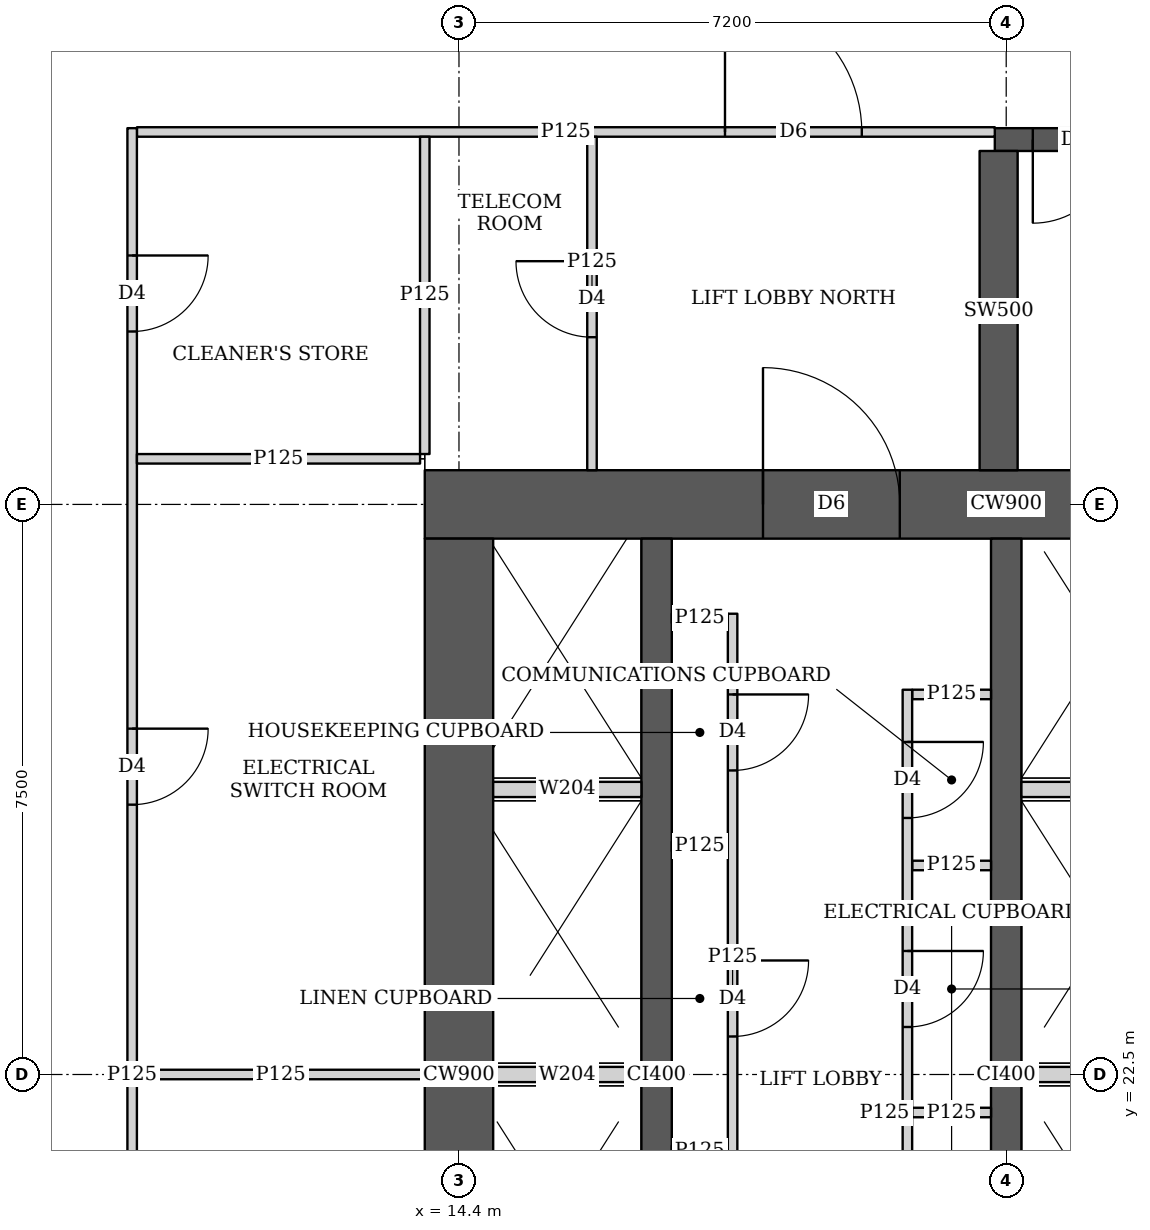
"""IFC4 building model, lengths in metres.
Left out: names, types, materials, properties, quantities, classifications, styles, units other than length and angle.
Written with IfcOpenShell. Run it as: python <this file> out.ifc"""

import sys

from ifc_helpers import new_model, si_unit, direction, frame, frame_2d, origin, place, context, subcontext, project, spatial, rectangle, extrude, element, fill, save


model = new_model("IFC4")
c1 = context("Model", 3, precision=1e-05, world=origin(), true_north=direction((0.0, 1.0)))
c2 = subcontext(c1, "Body", "Model", "MODEL_VIEW")
j1 = project(units=[si_unit("LENGTHUNIT", "METRE"), si_unit("PLANEANGLEUNIT", "RADIAN")], contexts=[c1])
p1 = place(None, origin())
s1 = spatial("IfcSite", under=j1, at=p1, CompositionType="ELEMENT")
p2 = place(p1, origin())
s2 = spatial("IfcBuilding", under=s1, at=p2, CompositionType="ELEMENT")
p3 = place(p2, frame((0.0, 0.0, 14.6)))
s3 = spatial("IfcBuildingStorey", under=s2, at=p3, CompositionType="ELEMENT", Elevation=14.6)
p4 = place(p3, frame((13.95, 30.0, 0.0), z_axis=(0.0, 0.0, 1.0), x_axis=(1.0, 0.0, 0.0)))
e1 = element("IfcWall", 1, at=p4, inside=s3, PredefinedType="SHEAR", context=c2, shape_type="SweptSolid", body=[
    extrude(rectangle(XDim=15.3, YDim=0.9, at=frame_2d((7.65, 0.0))), origin(), (0.0, 0.0, 1.0), 5.4),
])
p5 = place(p4, frame((4.45, 0.0, 0.0)))
e2 = element("IfcOpeningElement", 2, at=p5, cuts=e1, PredefinedType="OPENING", context=c2, shape_type="SweptSolid", body=[
    extrude(rectangle(XDim=1.8, YDim=2.1, at=frame_2d((0.9, 1.05))), frame((0.0, 0.46, 0.0), z_axis=(0.0, -1.0, 0.0), x_axis=(1.0, 0.0, 0.0)), (0.0, 0.0, 1.0), 0.92),
])
p6 = place(p4, frame((10.7, 0.0, 0.0)))
e3 = element("IfcOpeningElement", 3, at=p6, cuts=e1, PredefinedType="OPENING", context=c2, shape_type="SweptSolid", body=[
    extrude(rectangle(XDim=1.1, YDim=2.1, at=frame_2d((0.55, 1.05))), frame((0.0, 0.46, 0.0), z_axis=(0.0, -1.0, 0.0), x_axis=(1.0, 0.0, 0.0)), (0.0, 0.0, 1.0), 0.92),
])
p7 = place(p3, frame((14.4, 15.45, 0.0), z_axis=(0.0, 0.0, 1.0), x_axis=(0.0, 1.0, 0.0)))
e4 = element("IfcWall", 4, at=p7, inside=s3, PredefinedType="SHEAR", context=c2, shape_type="SweptSolid", body=[
    extrude(rectangle(XDim=14.1, YDim=0.9, at=frame_2d((7.05, 0.0))), origin(), (0.0, 0.0, 1.0), 5.4),
])
for number, where, z_axis, x_axis in (
    (5, (17.0, 15.45, 0.0), (0.0, 0.0, 1.0), (0.0, 1.0, 0.0)),
    (6, (21.6, 15.45, 0.0), (0.0, 0.0, 1.0), (0.0, 1.0, 0.0)),
):
    element("IfcWall", number, at=place(p3, frame(where, z_axis=z_axis, x_axis=x_axis)), inside=s3, PredefinedType="SHEAR", context=c2, shape_type="SweptSolid", body=[
        extrude(rectangle(XDim=14.1, YDim=0.4, at=frame_2d((7.05, 0.0))), origin(), (0.0, 0.0, 1.0), 5.4),
    ])
p8 = place(p3, frame((21.45, 34.8, 0.0), z_axis=(0.0, 0.0, 1.0), x_axis=(1.0, 0.0, 0.0)))
e7 = element("IfcWall", 7, at=p8, inside=s3, PredefinedType="SHEAR", context=c2, shape_type="SweptSolid", body=[
    extrude(rectangle(XDim=7.5, YDim=0.3, at=frame_2d((3.75, 0.0))), origin(), (0.0, 0.0, 1.0), 5.4),
])
p9 = place(p8, frame((0.5, 0.0, 0.0)))
e8 = element("IfcOpeningElement", 8, at=p9, cuts=e7, PredefinedType="OPENING", context=c2, shape_type="SweptSolid", body=[
    extrude(rectangle(XDim=1.1, YDim=2.1, at=frame_2d((0.55, 1.05))), frame((0.0, 0.16, 0.0), z_axis=(0.0, -1.0, 0.0), x_axis=(1.0, 0.0, 0.0)), (0.0, 0.0, 1.0), 0.32),
])
p10 = place(p3, frame((21.5, 30.45, 0.0), z_axis=(0.0, 0.0, 1.0), x_axis=(0.0, 1.0, 0.0)))
e9 = element("IfcWall", 9, at=p10, inside=s3, PredefinedType="SHEAR", context=c2, shape_type="SweptSolid", body=[
    extrude(rectangle(XDim=4.2, YDim=0.5, at=frame_2d((2.1, 0.0))), origin(), (0.0, 0.0, 1.0), 5.4),
])
p11 = place(p3, frame((10.1, 10.05, 0.0), z_axis=(0.0, 0.0, 1.0), x_axis=(0.0, 1.0, 0.0)))
e10 = element("IfcWall", 10, at=p11, inside=s3, PredefinedType="PARTITIONING", context=c2, shape_type="SweptSolid", body=[
    extrude(rectangle(XDim=24.9, YDim=0.125, at=frame_2d((12.45, 0.0))), origin(), (0.0, 0.0, 1.0), 3.5),
])
p12 = place(p11, frame((1.675, 0.0, 0.0)))
e11 = element("IfcOpeningElement", 11, at=p12, cuts=e10, PredefinedType="OPENING", context=c2, shape_type="SweptSolid", body=[
    extrude(rectangle(XDim=1.0, YDim=2.1, at=frame_2d((0.5, 1.05))), frame((0.0, 0.073, 0.0), z_axis=(0.0, -1.0, 0.0), x_axis=(1.0, 0.0, 0.0)), (0.0, 0.0, 1.0), 0.145),
])
p13 = place(p11, frame((7.9, 0.0, 0.0)))
e12 = element("IfcOpeningElement", 12, at=p13, cuts=e10, PredefinedType="OPENING", context=c2, shape_type="SweptSolid", body=[
    extrude(rectangle(XDim=1.0, YDim=2.1, at=frame_2d((0.5, 1.05))), frame((0.0, 0.073, 0.0), z_axis=(0.0, -1.0, 0.0), x_axis=(1.0, 0.0, 0.0)), (0.0, 0.0, 1.0), 0.145),
])
p14 = place(p11, frame((16.0, 0.0, 0.0)))
e13 = element("IfcOpeningElement", 13, at=p14, cuts=e10, PredefinedType="OPENING", context=c2, shape_type="SweptSolid", body=[
    extrude(rectangle(XDim=1.0, YDim=2.1, at=frame_2d((0.5, 1.05))), frame((0.0, 0.073, 0.0), z_axis=(0.0, -1.0, 0.0), x_axis=(1.0, 0.0, 0.0)), (0.0, 0.0, 1.0), 0.145),
])
p15 = place(p11, frame((22.225, 0.0, 0.0)))
e14 = element("IfcOpeningElement", 14, at=p15, cuts=e10, PredefinedType="OPENING", context=c2, shape_type="SweptSolid", body=[
    extrude(rectangle(XDim=1.0, YDim=2.1, at=frame_2d((0.5, 1.05))), frame((0.0, 0.073, 0.0), z_axis=(0.0, -1.0, 0.0), x_axis=(1.0, 0.0, 0.0)), (0.0, 0.0, 1.0), 0.145),
])
p16 = place(p3, frame((10.163, 22.5, 0.0), z_axis=(0.0, 0.0, 1.0), x_axis=(1.0, 0.0, 0.0)))
e15 = element("IfcWall", 15, at=p16, inside=s3, PredefinedType="PARTITIONING", context=c2, shape_type="SweptSolid", body=[
    extrude(rectangle(XDim=3.787, YDim=0.125, at=frame_2d((1.894, 0.0))), origin(), (0.0, 0.0, 1.0), 3.5),
])
p17 = place(p3, frame((10.163, 30.6, 0.0), z_axis=(0.0, 0.0, 1.0), x_axis=(1.0, 0.0, 0.0)))
e16 = element("IfcWall", 16, at=p17, inside=s3, PredefinedType="PARTITIONING", context=c2, shape_type="SweptSolid", body=[
    extrude(rectangle(XDim=3.725, YDim=0.125, at=frame_2d((1.862, 0.0))), origin(), (0.0, 0.0, 1.0), 3.5),
])
p18 = place(p3, frame((13.95, 30.663, 0.0), z_axis=(0.0, 0.0, 1.0), x_axis=(0.0, 1.0, 0.0)))
e17 = element("IfcWall", 17, at=p18, inside=s3, PredefinedType="PARTITIONING", context=c2, shape_type="SweptSolid", body=[
    extrude(rectangle(XDim=4.174, YDim=0.125, at=frame_2d((2.087, 0.0))), origin(), (0.0, 0.0, 1.0), 3.5),
])
p19 = place(p3, frame((10.163, 34.9, 0.0), z_axis=(0.0, 0.0, 1.0), x_axis=(1.0, 0.0, 0.0)))
e18 = element("IfcWall", 18, at=p19, inside=s3, PredefinedType="PARTITIONING", context=c2, shape_type="SweptSolid", body=[
    extrude(rectangle(XDim=11.287, YDim=0.125, at=frame_2d((5.644, 0.0))), origin(), (0.0, 0.0, 1.0), 3.1),
])
p20 = place(p19, frame((7.737, 0.0, 0.0)))
e19 = element("IfcOpeningElement", 19, at=p20, cuts=e18, PredefinedType="OPENING", context=c2, shape_type="SweptSolid", body=[
    extrude(rectangle(XDim=1.8, YDim=2.1, at=frame_2d((0.9, 1.05))), frame((0.0, 0.073, 0.0), z_axis=(0.0, -1.0, 0.0), x_axis=(1.0, 0.0, 0.0)), (0.0, 0.0, 1.0), 0.145),
])
p21 = place(p3, frame((16.15, 30.45, 0.0), z_axis=(0.0, 0.0, 1.0), x_axis=(0.0, 1.0, 0.0)))
e20 = element("IfcWall", 20, at=p21, inside=s3, PredefinedType="PARTITIONING", context=c2, shape_type="SweptSolid", body=[
    extrude(rectangle(XDim=4.387, YDim=0.125, at=frame_2d((2.193, 0.0))), origin(), (0.0, 0.0, 1.0), 5.1),
])
p22 = place(p21, frame((1.75, 0.0, 0.0)))
e21 = element("IfcOpeningElement", 21, at=p22, cuts=e20, PredefinedType="OPENING", context=c2, shape_type="SweptSolid", body=[
    extrude(rectangle(XDim=1.0, YDim=2.1, at=frame_2d((0.5, 1.05))), frame((0.0, 0.073, 0.0), z_axis=(0.0, -1.0, 0.0), x_axis=(1.0, 0.0, 0.0)), (0.0, 0.0, 1.0), 0.145),
])
p23 = place(p3, frame((20.3, 16.438, 0.0), z_axis=(0.0, 0.0, 1.0), x_axis=(0.0, 1.0, 0.0)))
e22 = element("IfcWall", 22, at=p23, inside=s3, PredefinedType="PARTITIONING", context=c2, shape_type="SweptSolid", body=[
    extrude(rectangle(XDim=11.124, YDim=0.125, at=frame_2d((5.562, 0.0))), origin(), (0.0, 0.0, 1.0), 5.1),
])
p24 = place(p23, frame((0.937, 0.0, 0.0)))
e23 = element("IfcOpeningElement", 23, at=p24, cuts=e22, PredefinedType="OPENING", context=c2, shape_type="SweptSolid", body=[
    extrude(rectangle(XDim=1.0, YDim=2.1, at=frame_2d((0.5, 1.05))), frame((0.0, 0.073, 0.0), z_axis=(0.0, -1.0, 0.0), x_axis=(1.0, 0.0, 0.0)), (0.0, 0.0, 1.0), 0.145),
])
p25 = place(p23, frame((3.687, 0.0, 0.0)))
e24 = element("IfcOpeningElement", 24, at=p25, cuts=e22, PredefinedType="OPENING", context=c2, shape_type="SweptSolid", body=[
    extrude(rectangle(XDim=1.0, YDim=2.1, at=frame_2d((0.5, 1.05))), frame((0.0, 0.073, 0.0), z_axis=(0.0, -1.0, 0.0), x_axis=(1.0, 0.0, 0.0)), (0.0, 0.0, 1.0), 0.145),
])
p26 = place(p23, frame((6.687, 0.0, 0.0)))
e25 = element("IfcOpeningElement", 25, at=p26, cuts=e22, PredefinedType="OPENING", context=c2, shape_type="SweptSolid", body=[
    extrude(rectangle(XDim=1.0, YDim=2.1, at=frame_2d((0.5, 1.05))), frame((0.0, 0.073, 0.0), z_axis=(0.0, -1.0, 0.0), x_axis=(1.0, 0.0, 0.0)), (0.0, 0.0, 1.0), 0.145),
])
p27 = place(p23, frame((9.437, 0.0, 0.0)))
e26 = element("IfcOpeningElement", 26, at=p27, cuts=e22, PredefinedType="OPENING", context=c2, shape_type="SweptSolid", body=[
    extrude(rectangle(XDim=1.0, YDim=2.1, at=frame_2d((0.5, 1.05))), frame((0.0, 0.073, 0.0), z_axis=(0.0, -1.0, 0.0), x_axis=(1.0, 0.0, 0.0)), (0.0, 0.0, 1.0), 0.145),
])
for number, where, z_axis, x_axis in (
    (27, (20.363, 27.5, 0.0), (0.0, 0.0, 1.0), (1.0, 0.0, 0.0)),
    (28, (20.363, 22.0, 0.0), (0.0, 0.0, 1.0), (1.0, 0.0, 0.0)),
    (29, (20.363, 25.25, 0.0), (0.0, 0.0, 1.0), (1.0, 0.0, 0.0)),
):
    element("IfcWall", number, at=place(p3, frame(where, z_axis=z_axis, x_axis=x_axis)), inside=s3, PredefinedType="PARTITIONING", context=c2, shape_type="SweptSolid", body=[
        extrude(rectangle(XDim=1.037, YDim=0.125, at=frame_2d((0.519, 0.0))), origin(), (0.0, 0.0, 1.0), 5.1),
    ])
p28 = place(p3, frame((18.0, 28.562, 0.0), z_axis=(0.0, 0.0, 1.0), x_axis=(0.0, -1.0, 0.0)))
e30 = element("IfcWall", 30, at=p28, inside=s3, PredefinedType="PARTITIONING", context=c2, shape_type="SweptSolid", body=[
    extrude(rectangle(XDim=10.124, YDim=0.125, at=frame_2d((5.062, 0.0))), origin(), (0.0, 0.0, 1.0), 5.1),
])
p29 = place(p28, frame((8.062, 0.0, 0.0)))
e31 = element("IfcOpeningElement", 31, at=p29, cuts=e30, PredefinedType="OPENING", context=c2, shape_type="SweptSolid", body=[
    extrude(rectangle(XDim=1.0, YDim=2.1, at=frame_2d((0.5, 1.05))), frame((0.0, 0.073, 0.0), z_axis=(0.0, -1.0, 0.0), x_axis=(1.0, 0.0, 0.0)), (0.0, 0.0, 1.0), 0.145),
])
p30 = place(p28, frame((4.562, 0.0, 0.0)))
e32 = element("IfcOpeningElement", 32, at=p30, cuts=e30, PredefinedType="OPENING", context=c2, shape_type="SweptSolid", body=[
    extrude(rectangle(XDim=1.0, YDim=2.1, at=frame_2d((0.5, 1.05))), frame((0.0, 0.073, 0.0), z_axis=(0.0, -1.0, 0.0), x_axis=(1.0, 0.0, 0.0)), (0.0, 0.0, 1.0), 0.145),
])
p31 = place(p28, frame((1.062, 0.0, 0.0)))
e33 = element("IfcOpeningElement", 33, at=p31, cuts=e30, PredefinedType="OPENING", context=c2, shape_type="SweptSolid", body=[
    extrude(rectangle(XDim=1.0, YDim=2.1, at=frame_2d((0.5, 1.05))), frame((0.0, 0.073, 0.0), z_axis=(0.0, -1.0, 0.0), x_axis=(1.0, 0.0, 0.0)), (0.0, 0.0, 1.0), 0.145),
])
for number, where, z_axis, x_axis in (
    (34, (17.2, 28.5, 0.0), (0.0, 0.0, 1.0), (1.0, 0.0, 0.0)),
    (35, (17.2, 21.5, 0.0), (0.0, 0.0, 1.0), (1.0, 0.0, 0.0)),
    (36, (17.2, 25.5, 0.0), (0.0, 0.0, 1.0), (1.0, 0.0, 0.0)),
):
    element("IfcWall", number, at=place(p3, frame(where, z_axis=z_axis, x_axis=x_axis)), inside=s3, PredefinedType="PARTITIONING", context=c2, shape_type="SweptSolid", body=[
        extrude(rectangle(XDim=0.738, YDim=0.125, at=frame_2d((0.369, 0.0))), origin(), (0.0, 0.0, 1.0), 5.1),
    ])
p32 = place(p3, frame((14.85, 22.5, 0.0), z_axis=(0.0, 0.0, 1.0), x_axis=(1.0, 0.0, 0.0)))
e37 = element("IfcWall", 37, at=p32, inside=s3, PredefinedType="SOLIDWALL", context=c2, shape_type="SweptSolid", body=[
    extrude(rectangle(XDim=1.95, YDim=0.2, at=frame_2d((0.975, 0.0))), origin(), (0.0, 0.0, 1.0), 5.1),
])
p33 = place(p3, frame((21.8, 22.5, 0.0), z_axis=(0.0, 0.0, 1.0), x_axis=(1.0, 0.0, 0.0)))
e38 = element("IfcWall", 38, at=p33, inside=s3, PredefinedType="SOLIDWALL", context=c2, shape_type="SweptSolid", body=[
    extrude(rectangle(XDim=2.2, YDim=0.2, at=frame_2d((1.1, 0.0))), origin(), (0.0, 0.0, 1.0), 5.1),
])
p34 = place(p3, frame((14.85, 26.25, 0.0), z_axis=(0.0, 0.0, 1.0), x_axis=(1.0, 0.0, 0.0)))
e39 = element("IfcWall", 39, at=p34, inside=s3, PredefinedType="SOLIDWALL", context=c2, shape_type="SweptSolid", body=[
    extrude(rectangle(XDim=1.95, YDim=0.2, at=frame_2d((0.975, 0.0))), origin(), (0.0, 0.0, 1.0), 5.1),
])
p35 = place(p3, frame((21.8, 26.25, 0.0), z_axis=(0.0, 0.0, 1.0), x_axis=(1.0, 0.0, 0.0)))
e40 = element("IfcWall", 40, at=p35, inside=s3, PredefinedType="SOLIDWALL", context=c2, shape_type="SweptSolid", body=[
    extrude(rectangle(XDim=2.2, YDim=0.2, at=frame_2d((1.1, 0.0))), origin(), (0.0, 0.0, 1.0), 5.1),
])
p36 = place(p14, origin())
e41 = element("IfcDoor", 41, at=p36, inside=s3, OperationType="SINGLE_SWING_LEFT", PredefinedType="DOOR", context=c2, shape_type="SweptSolid", body=[
    extrude(rectangle(XDim=1.0, YDim=2.1, at=frame_2d((0.5, 1.05))), frame((0.0, 0.025, 0.0), z_axis=(0.0, -1.0, 0.0), x_axis=(1.0, 0.0, 0.0)), (0.0, 0.0, 1.0), 0.05),
])
fill(e13, e41)
p37 = place(p15, origin())
e42 = element("IfcDoor", 42, at=p37, inside=s3, OperationType="SINGLE_SWING_LEFT", PredefinedType="DOOR", context=c2, shape_type="SweptSolid", body=[
    extrude(rectangle(XDim=1.0, YDim=2.1, at=frame_2d((0.5, 1.05))), frame((0.0, 0.025, 0.0), z_axis=(0.0, -1.0, 0.0), x_axis=(1.0, 0.0, 0.0)), (0.0, 0.0, 1.0), 0.05),
])
fill(e14, e42)
p38 = place(p22, origin())
e43 = element("IfcDoor", 43, at=p38, inside=s3, OperationType="SINGLE_SWING_RIGHT", PredefinedType="DOOR", context=c2, shape_type="SweptSolid", body=[
    extrude(rectangle(XDim=1.0, YDim=2.1, at=frame_2d((0.5, 1.05))), frame((0.0, 0.025, 0.0), z_axis=(0.0, -1.0, 0.0), x_axis=(1.0, 0.0, 0.0)), (0.0, 0.0, 1.0), 0.05),
])
fill(e21, e43)
p39 = place(p20, origin())
e44 = element("IfcDoor", 44, at=p39, inside=s3, OperationType="DOUBLE_DOOR_SINGLE_SWING", PredefinedType="DOOR", context=c2, shape_type="SweptSolid", body=[
    extrude(rectangle(XDim=1.8, YDim=2.1, at=frame_2d((0.9, 1.05))), frame((0.0, 0.025, 0.0), z_axis=(0.0, -1.0, 0.0), x_axis=(1.0, 0.0, 0.0)), (0.0, 0.0, 1.0), 0.05),
])
fill(e19, e44)
p40 = place(p26, origin())
e45 = element("IfcDoor", 45, at=p40, inside=s3, OperationType="SINGLE_SWING_LEFT", PredefinedType="DOOR", context=c2, shape_type="SweptSolid", body=[
    extrude(rectangle(XDim=1.0, YDim=2.1, at=frame_2d((0.5, 1.05))), frame((0.0, 0.025, 0.0), z_axis=(0.0, -1.0, 0.0), x_axis=(1.0, 0.0, 0.0)), (0.0, 0.0, 1.0), 0.05),
])
fill(e25, e45)
p41 = place(p27, origin())
e46 = element("IfcDoor", 46, at=p41, inside=s3, OperationType="SINGLE_SWING_LEFT", PredefinedType="DOOR", context=c2, shape_type="SweptSolid", body=[
    extrude(rectangle(XDim=1.0, YDim=2.1, at=frame_2d((0.5, 1.05))), frame((0.0, 0.025, 0.0), z_axis=(0.0, -1.0, 0.0), x_axis=(1.0, 0.0, 0.0)), (0.0, 0.0, 1.0), 0.05),
])
fill(e26, e46)
p42 = place(p30, origin())
e47 = element("IfcDoor", 47, at=p42, inside=s3, OperationType="SINGLE_SWING_LEFT", PredefinedType="DOOR", context=c2, shape_type="SweptSolid", body=[
    extrude(rectangle(XDim=1.0, YDim=2.1, at=frame_2d((0.5, 1.05))), frame((0.0, 0.025, 0.0), z_axis=(0.0, -1.0, 0.0), x_axis=(1.0, 0.0, 0.0)), (0.0, 0.0, 1.0), 0.05),
])
fill(e32, e47)
p43 = place(p31, origin())
e48 = element("IfcDoor", 48, at=p43, inside=s3, OperationType="SINGLE_SWING_LEFT", PredefinedType="DOOR", context=c2, shape_type="SweptSolid", body=[
    extrude(rectangle(XDim=1.0, YDim=2.1, at=frame_2d((0.5, 1.05))), frame((0.0, 0.025, 0.0), z_axis=(0.0, -1.0, 0.0), x_axis=(1.0, 0.0, 0.0)), (0.0, 0.0, 1.0), 0.05),
])
fill(e33, e48)
p44 = place(p5, origin())
e49 = element("IfcDoor", 49, at=p44, inside=s3, OperationType="DOUBLE_DOOR_SINGLE_SWING", PredefinedType="DOOR", context=c2, shape_type="SweptSolid", body=[
    extrude(rectangle(XDim=1.8, YDim=2.1, at=frame_2d((0.9, 1.05))), frame((0.0, 0.025, 0.0), z_axis=(0.0, -1.0, 0.0), x_axis=(1.0, 0.0, 0.0)), (0.0, 0.0, 1.0), 0.05),
])
fill(e2, e49)
p45 = place(p9, origin())
e50 = element("IfcDoor", 50, at=p45, inside=s3, OperationType="SINGLE_SWING_RIGHT", PredefinedType="DOOR", context=c2, shape_type="SweptSolid", body=[
    extrude(rectangle(XDim=1.1, YDim=2.1, at=frame_2d((0.55, 1.05))), frame((0.0, 0.025, 0.0), z_axis=(0.0, -1.0, 0.0), x_axis=(1.0, 0.0, 0.0)), (0.0, 0.0, 1.0), 0.05),
])
fill(e8, e50)
save(model, sys.argv[1])
